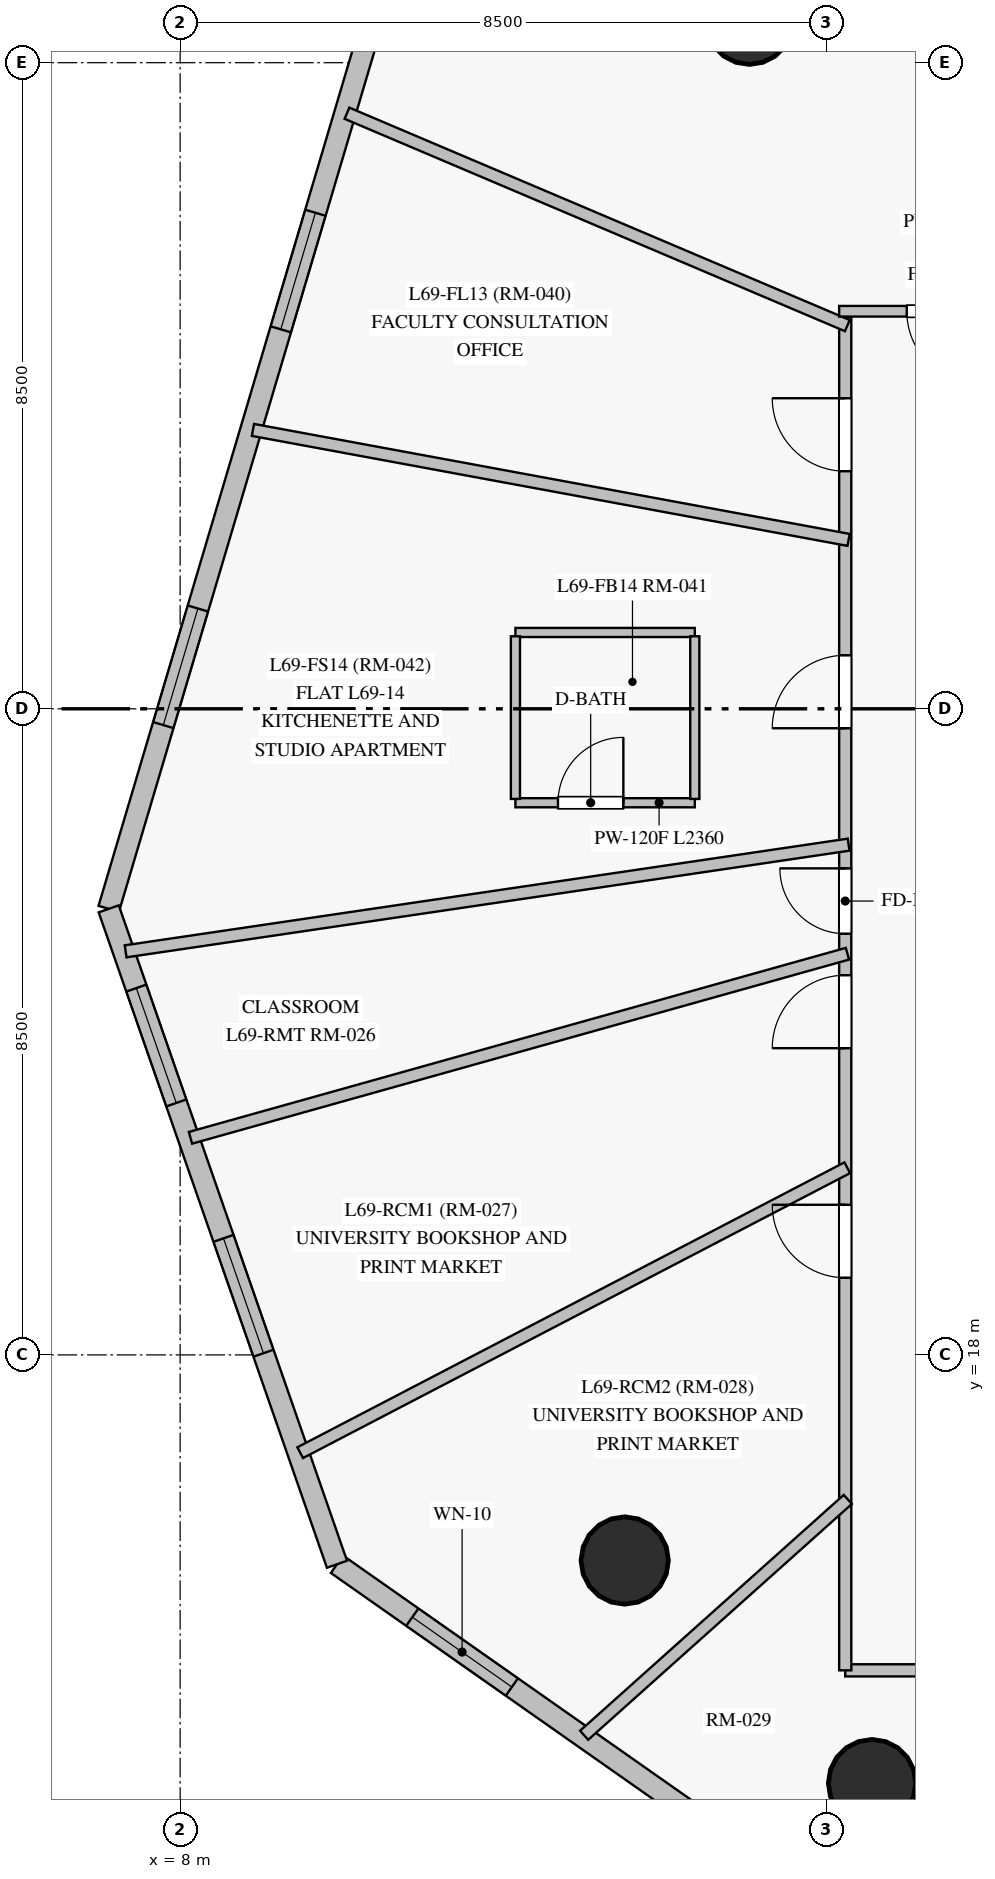
"""IFC4 building model, lengths in metres.
Left out: names, types, materials, properties, quantities, classifications, styles, units other than length and angle.
Written with IfcOpenShell. Run it as: python <this file> out.ifc"""

import sys

from ifc_helpers import new_model, si_unit, direction, frame, frame_2d, origin, origin_with_axes, origin_2d, place, context, subcontext, project, spatial, rectangle, circle, extrude, source, transform, mapped, element, fill, save


model = new_model("IFC4")
c1 = context("Model", 3, precision=1e-05, world=origin(), true_north=direction((0.0, 1.0)))
c2 = subcontext(c1, "Body", "Model", "MODEL_VIEW")
j1 = project(units=[si_unit("LENGTHUNIT", "METRE"), si_unit("PLANEANGLEUNIT", "RADIAN")], contexts=[c1])
p1 = place(None, origin())
s1 = spatial("IfcSite", under=j1, at=p1, CompositionType="ELEMENT")
p2 = place(p1, origin())
s2 = spatial("IfcBuilding", under=s1, at=p2, CompositionType="ELEMENT")
p3 = place(p2, frame((0.0, 0.0, 235.2)))
s3 = spatial("IfcBuildingStorey", under=s2, at=p3, CompositionType="ELEMENT", Elevation=235.2)
m1 = source(origin_with_axes(), c2, "Body", "SweptSolid", [
    extrude(circle(Radius=0.575, at=origin_2d()), origin(), (0.0, 0.0, 1.0), 3.05),
])
for number, where, z_axis, x_axis in (
    (1, (15.49, 35.552, 0.0), (0.0, 0.0, 1.0), (1.0, 0.0, 0.0)),
    (2, (13.849, 15.295, 0.0), (0.0, 0.0, 1.0), (1.0, 0.0, 0.0)),
    (3, (17.103, 12.366, 0.0), (0.0, 0.0, 1.0), (1.0, 0.0, 0.0)),
):
    element("IfcColumn", number, at=place(p3, frame(where, z_axis=z_axis, x_axis=x_axis)), inside=s3, PredefinedType="COLUMN", context=c2, shape_type="MappedRepresentation", body=[
        mapped(m1, transform((0.0, 0.0, 0.0), scale=1.0)),
    ])
p4 = place(p3, frame((10.063, 15.246, 0.0), z_axis=(0.0, 0.0, 1.0), x_axis=(0.818518081976, -0.574480765108, 0.0)))
e4 = element("IfcWall", 4, at=p4, inside=s3, PredefinedType="SOLIDWALL", context=c2, shape_type="SweptSolid", body=[
    extrude(rectangle(XDim=12.206, YDim=0.28, at=frame_2d((6.103, 0.0))), origin(), (0.0, 0.0, 1.0), 2.85),
])
p5 = place(p4, frame((1.211, 0.0, 0.85)))
e5 = element("IfcOpeningElement", 5, at=p5, cuts=e4, PredefinedType="OPENING", context=c2, shape_type="SweptSolid", body=[
    extrude(rectangle(XDim=1.6, YDim=1.6, at=frame_2d((0.8, 0.8))), frame((0.0, 0.15, 0.0), z_axis=(0.0, -1.0, 0.0), x_axis=(1.0, 0.0, 0.0)), (0.0, 0.0, 1.0), 0.3),
])
p6 = place(p4, frame((6.379, 0.0, 0.85)))
e6 = element("IfcOpeningElement", 6, at=p6, cuts=e4, PredefinedType="OPENING", context=c2, shape_type="SweptSolid", body=[
    extrude(rectangle(XDim=1.6, YDim=1.6, at=frame_2d((0.8, 0.8))), frame((0.0, 0.15, 0.0), z_axis=(0.0, -1.0, 0.0), x_axis=(1.0, 0.0, 0.0)), (0.0, 0.0, 1.0), 0.3),
])
p7 = place(p3, frame((10.535, 35.569, 0.0), z_axis=(0.0, 0.0, 1.0), x_axis=(-0.284636486509, -0.958635525394, 0.0)))
e7 = element("IfcWall", 7, at=p7, inside=s3, PredefinedType="SOLIDWALL", context=c2, shape_type="SweptSolid", body=[
    extrude(rectangle(XDim=12.206, YDim=0.28, at=frame_2d((6.103, 0.0))), origin(), (0.0, 0.0, 1.0), 2.85),
])
p8 = place(p7, frame((2.653, 0.0, 0.85)))
e8 = element("IfcOpeningElement", 8, at=p8, cuts=e7, PredefinedType="OPENING", context=c2, shape_type="SweptSolid", body=[
    extrude(rectangle(XDim=1.6, YDim=1.6, at=frame_2d((0.8, 0.8))), frame((0.0, 0.15, 0.0), z_axis=(0.0, -1.0, 0.0), x_axis=(1.0, 0.0, 0.0)), (0.0, 0.0, 1.0), 0.3),
])
p9 = place(p7, frame((8.084, 0.0, 0.85)))
e9 = element("IfcOpeningElement", 9, at=p9, cuts=e7, PredefinedType="OPENING", context=c2, shape_type="SweptSolid", body=[
    extrude(rectangle(XDim=1.6, YDim=1.6, at=frame_2d((0.8, 0.8))), frame((0.0, 0.15, 0.0), z_axis=(0.0, -1.0, 0.0), x_axis=(1.0, 0.0, 0.0)), (0.0, 0.0, 1.0), 0.3),
])
p10 = place(p3, frame((7.061, 23.868, 0.0), z_axis=(0.0, 0.0, 1.0), x_axis=(0.328874263267, -0.944373717847, 0.0)))
e10 = element("IfcWall", 10, at=p10, inside=s3, PredefinedType="SOLIDWALL", context=c2, shape_type="SweptSolid", body=[
    extrude(rectangle(XDim=9.13, YDim=0.28, at=frame_2d((4.565, 0.0))), origin(), (0.0, 0.0, 1.0), 2.85),
])
p11 = place(p10, frame((1.104, 0.0, 0.85)))
e11 = element("IfcOpeningElement", 11, at=p11, cuts=e10, PredefinedType="OPENING", context=c2, shape_type="SweptSolid", body=[
    extrude(rectangle(XDim=1.6, YDim=1.6, at=frame_2d((0.8, 0.8))), frame((0.0, 0.15, 0.0), z_axis=(0.0, -1.0, 0.0), x_axis=(1.0, 0.0, 0.0)), (0.0, 0.0, 1.0), 0.3),
])
p12 = place(p10, frame((4.59, 0.0, 0.85)))
e12 = element("IfcOpeningElement", 12, at=p12, cuts=e10, PredefinedType="OPENING", context=c2, shape_type="SweptSolid", body=[
    extrude(rectangle(XDim=1.6, YDim=1.6, at=frame_2d((0.8, 0.8))), frame((0.0, 0.15, 0.0), z_axis=(0.0, -1.0, 0.0), x_axis=(1.0, 0.0, 0.0)), (0.0, 0.0, 1.0), 0.3),
])
p13 = place(p3, frame((39.53, 13.85, 0.0), z_axis=(0.0, 0.0, 1.0), x_axis=(-1.0, 0.0, 0.0)))
e13 = element("IfcWall", 13, at=p13, inside=s3, PredefinedType="PARTITIONING", context=c2, shape_type="SweptSolid", body=[
    extrude(rectangle(XDim=22.78, YDim=0.16, at=frame_2d((11.39, 0.0))), origin(), (0.0, 0.0, 1.0), 2.3),
])
p14 = place(p13, frame((19.996, 0.0, 0.0)))
e14 = element("IfcOpeningElement", 14, at=p14, cuts=e13, PredefinedType="OPENING", context=c2, shape_type="SweptSolid", body=[
    extrude(rectangle(XDim=0.96, YDim=2.15, at=frame_2d((0.48, 1.075))), frame((0.0, 0.09, 0.0), z_axis=(0.0, -1.0, 0.0), x_axis=(1.0, 0.0, 0.0)), (0.0, 0.0, 1.0), 0.18),
])
p15 = place(p13, frame((14.236, 0.0, 0.0)))
e15 = element("IfcOpeningElement", 15, at=p15, cuts=e13, PredefinedType="OPENING", context=c2, shape_type="SweptSolid", body=[
    extrude(rectangle(XDim=0.96, YDim=2.15, at=frame_2d((0.48, 1.075))), frame((0.0, 0.09, 0.0), z_axis=(0.0, -1.0, 0.0), x_axis=(1.0, 0.0, 0.0)), (0.0, 0.0, 1.0), 0.18),
])
p16 = place(p13, frame((10.841, 0.0, 0.0)))
e16 = element("IfcOpeningElement", 16, at=p16, cuts=e13, PredefinedType="OPENING", context=c2, shape_type="SweptSolid", body=[
    extrude(rectangle(XDim=0.96, YDim=2.15, at=frame_2d((0.48, 1.075))), frame((0.0, 0.09, 0.0), z_axis=(0.0, -1.0, 0.0), x_axis=(1.0, 0.0, 0.0)), (0.0, 0.0, 1.0), 0.18),
])
p17 = place(p13, frame((5.183, 0.0, 0.0)))
e17 = element("IfcOpeningElement", 17, at=p17, cuts=e13, PredefinedType="OPENING", context=c2, shape_type="SweptSolid", body=[
    extrude(rectangle(XDim=0.96, YDim=2.15, at=frame_2d((0.48, 1.075))), frame((0.0, 0.09, 0.0), z_axis=(0.0, -1.0, 0.0), x_axis=(1.0, 0.0, 0.0)), (0.0, 0.0, 1.0), 0.18),
])
p18 = place(p3, frame((16.75, 13.85, 0.0), z_axis=(0.0, 0.0, 1.0), x_axis=(0.0, 1.0, 0.0)))
e18 = element("IfcWall", 18, at=p18, inside=s3, PredefinedType="PARTITIONING", context=c2, shape_type="SweptSolid", body=[
    extrude(rectangle(XDim=17.8, YDim=0.16, at=frame_2d((8.9, 0.0))), origin(), (0.0, 0.0, 1.0), 2.45),
])
p19 = place(p18, frame((12.394, 0.0, 0.0)))
e19 = element("IfcOpeningElement", 19, at=p19, cuts=e18, PredefinedType="OPENING", context=c2, shape_type="SweptSolid", body=[
    extrude(rectangle(XDim=0.96, YDim=2.15, at=frame_2d((0.48, 1.075))), frame((0.0, 0.09, 0.0), z_axis=(0.0, -1.0, 0.0), x_axis=(1.0, 0.0, 0.0)), (0.0, 0.0, 1.0), 0.18),
])
p20 = place(p18, frame((9.691, 0.0, 0.0)))
e20 = element("IfcOpeningElement", 20, at=p20, cuts=e18, PredefinedType="OPENING", context=c2, shape_type="SweptSolid", body=[
    extrude(rectangle(XDim=0.86, YDim=2.1, at=frame_2d((0.43, 1.05))), frame((0.0, 0.09, 0.0), z_axis=(0.0, -1.0, 0.0), x_axis=(1.0, 0.0, 0.0)), (0.0, 0.0, 1.0), 0.18),
])
p21 = place(p18, frame((8.185, 0.0, 0.0)))
e21 = element("IfcOpeningElement", 21, at=p21, cuts=e18, PredefinedType="OPENING", context=c2, shape_type="SweptSolid", body=[
    extrude(rectangle(XDim=0.96, YDim=2.15, at=frame_2d((0.48, 1.075))), frame((0.0, 0.09, 0.0), z_axis=(0.0, -1.0, 0.0), x_axis=(1.0, 0.0, 0.0)), (0.0, 0.0, 1.0), 0.18),
])
p22 = place(p18, frame((5.165, 0.0, 0.0)))
e22 = element("IfcOpeningElement", 22, at=p22, cuts=e18, PredefinedType="OPENING", context=c2, shape_type="SweptSolid", body=[
    extrude(rectangle(XDim=0.96, YDim=2.15, at=frame_2d((0.48, 1.075))), frame((0.0, 0.09, 0.0), z_axis=(0.0, -1.0, 0.0), x_axis=(1.0, 0.0, 0.0)), (0.0, 0.0, 1.0), 0.18),
])
p23 = place(p18, frame((15.776, 0.0, 0.0)))
e23 = element("IfcOpeningElement", 23, at=p23, cuts=e18, PredefinedType="OPENING", context=c2, shape_type="SweptSolid", body=[
    extrude(rectangle(XDim=0.96, YDim=2.15, at=frame_2d((0.48, 1.075))), frame((0.0, 0.09, 0.0), z_axis=(0.0, -1.0, 0.0), x_axis=(1.0, 0.0, 0.0)), (0.0, 0.0, 1.0), 0.18),
])
p24 = place(p3, frame((7.283, 23.309, 0.0), z_axis=(0.0, 0.0, 1.0), x_axis=(0.989291084864, 0.145955984492, 0.0)))
e24 = element("IfcWall", 24, at=p24, inside=s3, PredefinedType="PARTITIONING", context=c2, shape_type="SweptSolid", body=[
    extrude(rectangle(XDim=9.615, YDim=0.16, at=frame_2d((4.807, 0.0))), origin(), (0.0, 0.0, 1.0), 2.85),
])
p25 = place(p3, frame((16.779, 23.278, 0.0), z_axis=(0.0, 0.0, 1.0), x_axis=(-0.962914565551, -0.269806485189, 0.0)))
e25 = element("IfcWall", 25, at=p25, inside=s3, PredefinedType="PARTITIONING", context=c2, shape_type="SweptSolid", body=[
    extrude(rectangle(XDim=8.975, YDim=0.16, at=frame_2d((4.488, 0.0))), origin(), (0.0, 0.0, 1.0), 2.85),
])
p26 = place(p3, frame((16.777, 20.462, 0.0), z_axis=(0.0, 0.0, 1.0), x_axis=(-0.886916138467, -0.46193047456, 0.0)))
e26 = element("IfcWall", 26, at=p26, inside=s3, PredefinedType="PARTITIONING", context=c2, shape_type="SweptSolid", body=[
    extrude(rectangle(XDim=8.115, YDim=0.16, at=frame_2d((4.058, 0.0))), origin(), (0.0, 0.0, 1.0), 2.85),
])
p27 = place(p3, frame((16.794, 28.722, 0.0), z_axis=(0.0, 0.0, 1.0), x_axis=(-0.983386471677, 0.181524233432, 0.0)))
e27 = element("IfcWall", 27, at=p27, inside=s3, PredefinedType="PARTITIONING", context=c2, shape_type="SweptSolid", body=[
    extrude(rectangle(XDim=7.969, YDim=0.16, at=frame_2d((3.984, 0.0))), origin(), (0.0, 0.0, 1.0), 2.85),
])
p28 = place(p3, frame((16.778, 31.541, 0.0), z_axis=(0.0, 0.0, 1.0), x_axis=(-0.920506259016, 0.390727817173, 0.0)))
e28 = element("IfcWall", 28, at=p28, inside=s3, PredefinedType="PARTITIONING", context=c2, shape_type="SweptSolid", body=[
    extrude(rectangle(XDim=7.151, YDim=0.16, at=frame_2d((3.576, 0.0))), origin(), (0.0, 0.0, 1.0), 2.85),
])
p29 = place(p3, frame((16.784, 16.098, 0.0), z_axis=(0.0, 0.0, 1.0), x_axis=(-0.745307168069, -0.666721250017, 0.0)))
e29 = element("IfcWall", 29, at=p29, inside=s3, PredefinedType="PARTITIONING", context=c2, shape_type="SweptSolid", body=[
    extrude(rectangle(XDim=4.654, YDim=0.16, at=frame_2d((2.327, 0.0))), origin(), (0.0, 0.0, 1.0), 2.85),
])
p30 = place(p3, frame((19.42, 31.73, 0.0), z_axis=(0.0, 0.0, 1.0), x_axis=(-1.0, 0.0, 0.0)))
e30 = element("IfcWall", 30, at=p30, inside=s3, PredefinedType="PARTITIONING", context=c2, shape_type="SweptSolid", body=[
    extrude(rectangle(XDim=2.75, YDim=0.14, at=frame_2d((1.375, 0.0))), origin(), (0.0, 0.0, 1.0), 2.85),
])
p31 = place(p30, frame((0.9, 0.0, 0.0)))
e31 = element("IfcOpeningElement", 31, at=p31, cuts=e30, PredefinedType="OPENING", context=c2, shape_type="SweptSolid", body=[
    extrude(rectangle(XDim=0.96, YDim=2.15, at=frame_2d((0.48, 1.075))), frame((0.0, 0.08, 0.0), z_axis=(0.0, -1.0, 0.0), x_axis=(1.0, 0.0, 0.0)), (0.0, 0.0, 1.0), 0.16),
])
p32 = place(p3, frame((12.411, 25.264, 0.0), z_axis=(0.0, 0.0, 1.0), x_axis=(1.0, 0.0, 0.0)))
e32 = element("IfcWall", 32, at=p32, inside=s3, PredefinedType="PARTITIONING", context=c2, shape_type="SweptSolid", body=[
    extrude(rectangle(XDim=2.36, YDim=0.12, at=frame_2d((1.18, 0.0))), origin(), (0.0, 0.0, 1.0), 2.85),
])
p33 = place(p32, frame((0.56, 0.0, 0.0)))
e33 = element("IfcOpeningElement", 33, at=p33, cuts=e32, PredefinedType="OPENING", context=c2, shape_type="SweptSolid", body=[
    extrude(rectangle(XDim=0.86, YDim=2.1, at=frame_2d((0.43, 1.05))), frame((0.0, 0.07, 0.0), z_axis=(0.0, -1.0, 0.0), x_axis=(1.0, 0.0, 0.0)), (0.0, 0.0, 1.0), 0.14),
])
p34 = place(p3, frame((14.771, 27.504, 0.0), z_axis=(0.0, 0.0, 1.0), x_axis=(-1.0, 0.0, 0.0)))
e34 = element("IfcWall", 34, at=p34, inside=s3, PredefinedType="PARTITIONING", context=c2, shape_type="SweptSolid", body=[
    extrude(rectangle(XDim=2.36, YDim=0.12, at=frame_2d((1.18, 0.0))), origin(), (0.0, 0.0, 1.0), 2.85),
])
p35 = place(p3, frame((14.771, 25.314, 0.0), z_axis=(0.0, 0.0, 1.0), x_axis=(0.0, 1.0, 0.0)))
e35 = element("IfcWall", 35, at=p35, inside=s3, PredefinedType="PARTITIONING", context=c2, shape_type="SweptSolid", body=[
    extrude(rectangle(XDim=2.14, YDim=0.12, at=frame_2d((1.07, 0.0))), origin(), (0.0, 0.0, 1.0), 2.3),
])
p36 = place(p3, frame((12.411, 27.454, 0.0), z_axis=(0.0, 0.0, 1.0), x_axis=(0.0, -1.0, 0.0)))
e36 = element("IfcWall", 36, at=p36, inside=s3, PredefinedType="PARTITIONING", context=c2, shape_type="SweptSolid", body=[
    extrude(rectangle(XDim=2.14, YDim=0.12, at=frame_2d((1.07, 0.0))), origin(), (0.0, 0.0, 1.0), 2.85),
])
m2 = source(origin_with_axes(), c2, "Body", "SweptSolid", [
    extrude(rectangle(XDim=1.6, YDim=1.6, at=frame_2d((0.8, 0.8))), frame((0.0, 0.03, 0.0), z_axis=(0.0, -1.0, 0.0), x_axis=(1.0, 0.0, 0.0)), (0.0, 0.0, 1.0), 0.06),
])
p37 = place(p5, origin())
e37 = element("IfcWindow", 37, at=p37, inside=s3, PartitioningType="SINGLE_PANEL", PredefinedType="WINDOW", context=c2, shape_type="MappedRepresentation", body=[
    mapped(m2, transform((0.0, 0.0, 0.0), scale=1.0)),
])
fill(e5, e37)
p38 = place(p8, origin())
e38 = element("IfcWindow", 38, at=p38, inside=s3, PartitioningType="SINGLE_PANEL", PredefinedType="WINDOW", context=c2, shape_type="MappedRepresentation", body=[
    mapped(m2, transform((0.0, 0.0, 0.0), scale=1.0)),
])
fill(e8, e38)
p39 = place(p9, origin())
e39 = element("IfcWindow", 39, at=p39, inside=s3, PartitioningType="SINGLE_PANEL", PredefinedType="WINDOW", context=c2, shape_type="MappedRepresentation", body=[
    mapped(m2, transform((0.0, 0.0, 0.0), scale=1.0)),
])
fill(e9, e39)
p40 = place(p11, origin())
e40 = element("IfcWindow", 40, at=p40, inside=s3, PartitioningType="SINGLE_PANEL", PredefinedType="WINDOW", context=c2, shape_type="MappedRepresentation", body=[
    mapped(m2, transform((0.0, 0.0, 0.0), scale=1.0)),
])
fill(e11, e40)
p41 = place(p12, origin())
e41 = element("IfcWindow", 41, at=p41, inside=s3, PartitioningType="SINGLE_PANEL", PredefinedType="WINDOW", context=c2, shape_type="MappedRepresentation", body=[
    mapped(m2, transform((0.0, 0.0, 0.0), scale=1.0)),
])
fill(e12, e41)
m3 = source(origin_with_axes(), c2, "Body", "SweptSolid", [
    extrude(rectangle(XDim=0.96, YDim=2.15, at=frame_2d((0.48, 1.075))), frame((0.0, 0.025, 0.0), z_axis=(0.0, -1.0, 0.0), x_axis=(1.0, 0.0, 0.0)), (0.0, 0.0, 1.0), 0.05),
])
p42 = place(p31, origin())
e42 = element("IfcDoor", 42, at=p42, inside=s3, OperationType="SINGLE_SWING_LEFT", PredefinedType="DOOR", context=c2, shape_type="MappedRepresentation", body=[
    mapped(m3, transform((0.0, 0.0, 0.0), scale=1.0)),
])
fill(e31, e42)
m4 = source(origin_with_axes(), c2, "Body", "SweptSolid", [
    extrude(rectangle(XDim=0.86, YDim=2.1, at=frame_2d((0.43, 1.05))), frame((0.0, 0.025, 0.0), z_axis=(0.0, -1.0, 0.0), x_axis=(1.0, 0.0, 0.0)), (0.0, 0.0, 1.0), 0.05),
])
p43 = place(p33, origin())
e43 = element("IfcDoor", 43, at=p43, inside=s3, OperationType="SINGLE_SWING_RIGHT", PredefinedType="DOOR", context=c2, shape_type="MappedRepresentation", body=[
    mapped(m4, transform((0.0, 0.0, 0.0), scale=1.0)),
])
fill(e33, e43)
p44 = place(p19, origin())
e44 = element("IfcDoor", 44, at=p44, inside=s3, OperationType="SINGLE_SWING_LEFT", PredefinedType="DOOR", context=c2, shape_type="MappedRepresentation", body=[
    mapped(m3, transform((0.0, 0.0, 0.0), scale=1.0)),
])
fill(e19, e44)
p45 = place(p20, origin())
e45 = element("IfcDoor", 45, at=p45, inside=s3, OperationType="SINGLE_SWING_RIGHT", PredefinedType="DOOR", context=c2, shape_type="MappedRepresentation", body=[
    mapped(m4, transform((0.0, 0.0, 0.0), scale=1.0)),
])
fill(e20, e45)
p46 = place(p21, origin())
e46 = element("IfcDoor", 46, at=p46, inside=s3, OperationType="SINGLE_SWING_LEFT", PredefinedType="DOOR", context=c2, shape_type="MappedRepresentation", body=[
    mapped(m3, transform((0.0, 0.0, 0.0), scale=1.0)),
])
fill(e21, e46)
p47 = place(p22, origin())
e47 = element("IfcDoor", 47, at=p47, inside=s3, OperationType="SINGLE_SWING_RIGHT", PredefinedType="DOOR", context=c2, shape_type="MappedRepresentation", body=[
    mapped(m3, transform((0.0, 0.0, 0.0), scale=1.0)),
])
fill(e22, e47)
p48 = place(p23, origin())
e48 = element("IfcDoor", 48, at=p48, inside=s3, OperationType="SINGLE_SWING_RIGHT", PredefinedType="DOOR", context=c2, shape_type="MappedRepresentation", body=[
    mapped(m3, transform((0.0, 0.0, 0.0), scale=1.0)),
])
fill(e23, e48)
save(model, sys.argv[1])
